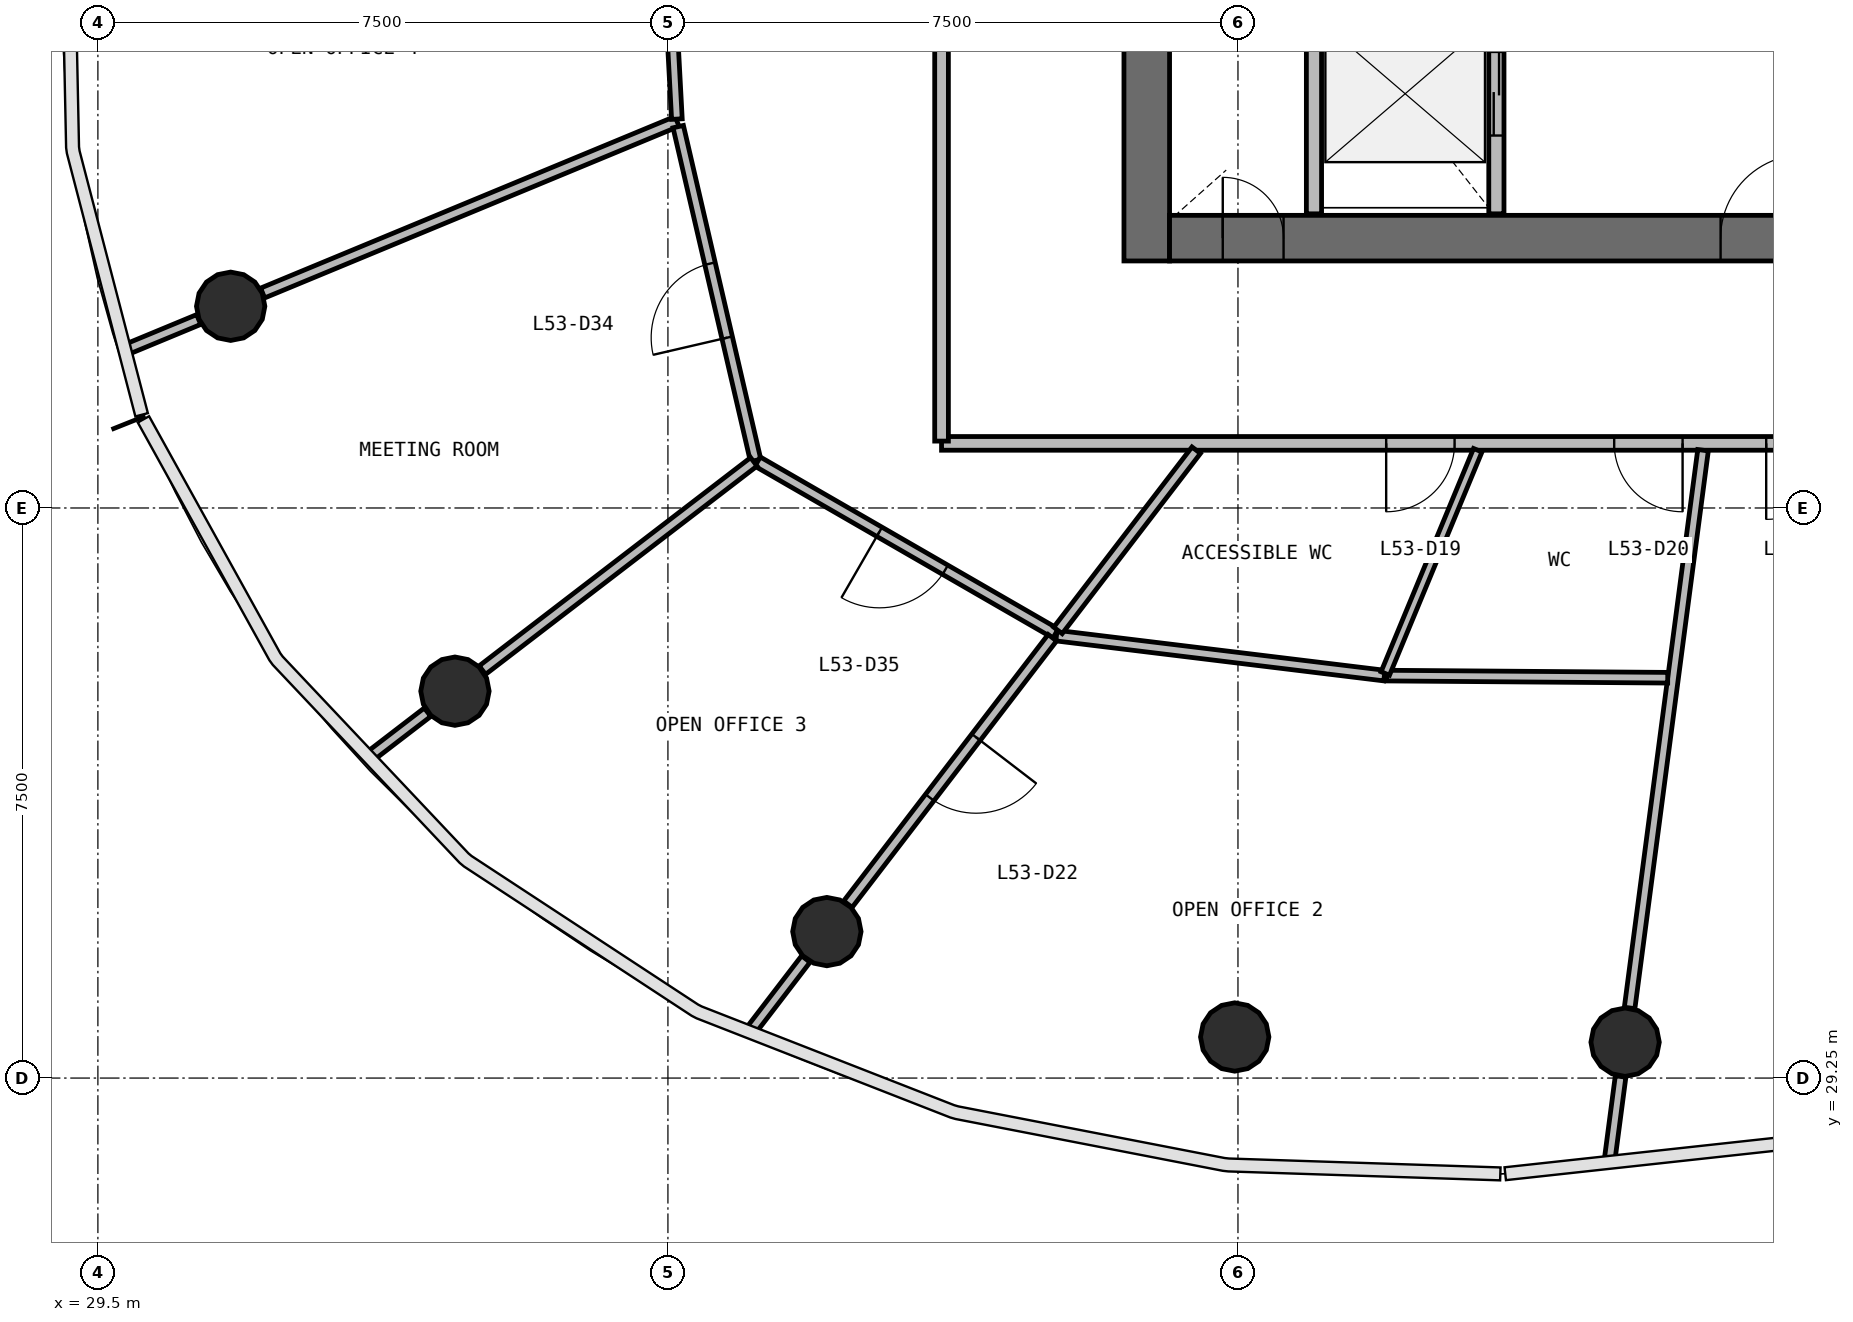
"""IFC4 building model, lengths in metres.
Left out: names, types, materials, properties, quantities, classifications, styles, units other than length and angle.
Written with IfcOpenShell. Run it as: python <this file> out.ifc"""

import sys

from ifc_helpers import new_model, si_unit, direction, frame, frame_2d, origin, origin_2d, place, context, subcontext, project, spatial, rectangle, circle, extrude, source, transform, mapped, element, fill, save


model = new_model("IFC4")
c1 = context("Model", 3, precision=1e-05, world=origin(), true_north=direction((0.0, 1.0)))
c2 = subcontext(c1, "Body", "Model", "MODEL_VIEW")
j1 = project(units=[si_unit("LENGTHUNIT", "METRE"), si_unit("PLANEANGLEUNIT", "RADIAN")], contexts=[c1])
p1 = place(None, origin())
s1 = spatial("IfcSite", under=j1, at=p1, CompositionType="ELEMENT")
p2 = place(p1, origin())
s2 = spatial("IfcBuilding", under=s1, at=p2, CompositionType="ELEMENT")
p3 = place(p2, frame((0.0, 0.0, 218.9)))
s3 = spatial("IfcBuildingStorey", under=s2, at=p3, CompositionType="ELEMENT", Elevation=218.9)
p4 = place(p3, frame((43.3, 56.0, 0.0), z_axis=(0.0, 0.0, 1.0), x_axis=(0.0, -1.0, 0.0)))
e1 = element("IfcWall", 1, at=p4, inside=s3, PredefinedType="SHEAR", context=c2, shape_type="SweptSolid", body=[
    extrude(rectangle(XDim=16.0, YDim=0.6, at=frame_2d((8.0, 0.0))), origin(), (0.0, 0.0, 1.0), 3.9),
])
p5 = place(p4, frame((7.1, 0.0, 0.0)))
e2 = element("IfcOpeningElement", 2, at=p5, cuts=e1, PredefinedType="OPENING", context=c2, shape_type="SweptSolid", body=[
    extrude(rectangle(XDim=1.8, YDim=2.1, at=frame_2d((0.9, 1.05))), frame((0.0, 0.31, 0.0), z_axis=(0.0, -1.0, 0.0), x_axis=(1.0, 0.0, 0.0)), (0.0, 0.0, 1.0), 0.62),
])
p6 = place(p3, frame((43.6, 40.3, 0.0), z_axis=(0.0, 0.0, 1.0), x_axis=(1.0, 0.0, 0.0)))
e3 = element("IfcWall", 3, at=p6, inside=s3, PredefinedType="SHEAR", context=c2, shape_type="SweptSolid", body=[
    extrude(rectangle(XDim=16.8, YDim=0.6, at=frame_2d((8.4, 0.0))), origin(), (0.0, 0.0, 1.0), 3.9),
])
p7 = place(p6, frame((10.3, 0.0, 0.0)))
e4 = element("IfcOpeningElement", 4, at=p7, cuts=e3, PredefinedType="OPENING", context=c2, shape_type="SweptSolid", body=[
    extrude(rectangle(XDim=1.2, YDim=2.1, at=frame_2d((0.6, 1.05))), frame((0.0, 0.31, 0.0), z_axis=(0.0, -1.0, 0.0), x_axis=(1.0, 0.0, 0.0)), (0.0, 0.0, 1.0), 0.62),
])
p8 = place(p6, frame((7.25, 0.0, 0.0)))
e5 = element("IfcOpeningElement", 5, at=p8, cuts=e3, PredefinedType="OPENING", context=c2, shape_type="SweptSolid", body=[
    extrude(rectangle(XDim=1.1, YDim=2.1, at=frame_2d((0.55, 1.05))), frame((0.0, 0.31, 0.0), z_axis=(0.0, -1.0, 0.0), x_axis=(1.0, 0.0, 0.0)), (0.0, 0.0, 1.0), 0.62),
])
p9 = place(p6, frame((0.7, 0.0, 0.0)))
e6 = element("IfcOpeningElement", 6, at=p9, cuts=e3, PredefinedType="OPENING", context=c2, shape_type="SweptSolid", body=[
    extrude(rectangle(XDim=0.8, YDim=2.1, at=frame_2d((0.4, 1.05))), frame((0.0, 0.31, 0.0), z_axis=(0.0, -1.0, 0.0), x_axis=(1.0, 0.0, 0.0)), (0.0, 0.0, 1.0), 0.62),
])
m1 = source(origin(), c2, "Body", "SweptSolid", [
    extrude(circle(Radius=0.45, at=origin_2d()), origin(), (0.0, 0.0, 1.0), 3.9),
])
for number, where, z_axis, x_axis in (
    (7, (31.247, 39.404, 0.0), (0.0, 0.0, 1.0), (1.0, 0.0, 0.0)),
    (8, (34.198, 34.34, 0.0), (0.0, 0.0, 1.0), (1.0, 0.0, 0.0)),
    (9, (39.091, 31.177, 0.0), (0.0, 0.0, 1.0), (1.0, 0.0, 0.0)),
    (10, (44.457, 29.79, 0.0), (0.0, 0.0, 1.0), (1.0, 0.0, 0.0)),
    (11, (49.594, 29.722, 0.0), (0.0, 0.0, 1.0), (1.0, 0.0, 0.0)),
):
    element("IfcColumn", number, at=place(p3, frame(where, z_axis=z_axis, x_axis=x_axis)), inside=s3, PredefinedType="COLUMN", context=c2, shape_type="MappedRepresentation", body=[
        mapped(m1, transform((0.0, 0.0, 0.0), scale=1.0)),
    ])
p10 = place(p3, frame((45.5, 43.6, 0.0), z_axis=(0.0, 0.0, 1.0), x_axis=(0.0, -1.0, 0.0)))
e12 = element("IfcWall", 12, at=p10, inside=s3, PredefinedType="SOLIDWALL", context=c2, shape_type="SweptSolid", body=[
    extrude(rectangle(XDim=2.98, YDim=0.2, at=frame_2d((1.49, 0.0))), origin(), (0.0, 0.0, 1.0), 3.58),
])
p11 = place(p3, frame((47.9, 40.62, 0.0), z_axis=(0.0, 0.0, 1.0), x_axis=(0.0, 1.0, 0.0)))
e13 = element("IfcWall", 13, at=p11, inside=s3, PredefinedType="SOLIDWALL", context=c2, shape_type="SweptSolid", body=[
    extrude(rectangle(XDim=2.95, YDim=0.2, at=frame_2d((1.475, 0.0))), origin(), (0.0, 0.0, 1.0), 3.58),
])
p12 = place(p11, frame((1.03, 0.0, 0.0)))
e14 = element("IfcOpeningElement", 14, at=p12, cuts=e13, PredefinedType="OPENING", context=c2, shape_type="SweptSolid", body=[
    extrude(rectangle(XDim=1.1, YDim=2.1, at=frame_2d((0.55, 1.05))), frame((0.0, 0.11, 0.0), z_axis=(0.0, -1.0, 0.0), x_axis=(1.0, 0.0, 0.0)), (0.0, 0.0, 1.0), 0.22),
])
p13 = place(p3, frame((63.4, 37.6, 0.0), z_axis=(0.0, 0.0, 1.0), x_axis=(-1.0, 0.0, 0.0)))
e15 = element("IfcWall", 15, at=p13, inside=s3, PredefinedType="PARTITIONING", context=c2, shape_type="SweptSolid", body=[
    extrude(rectangle(XDim=22.8, YDim=0.18, at=frame_2d((11.4, 0.0))), origin(), (0.0, 0.0, 1.0), 2.88),
])
p14 = place(p13, frame((16.05, 0.0, 0.0)))
e16 = element("IfcOpeningElement", 16, at=p14, cuts=e15, PredefinedType="OPENING", context=c2, shape_type="SweptSolid", body=[
    extrude(rectangle(XDim=0.9, YDim=2.1, at=frame_2d((0.45, 1.05))), frame((0.0, 0.1, 0.0), z_axis=(0.0, -1.0, 0.0), x_axis=(1.0, 0.0, 0.0)), (0.0, 0.0, 1.0), 0.2),
])
p15 = place(p13, frame((13.05, 0.0, 0.0)))
e17 = element("IfcOpeningElement", 17, at=p15, cuts=e15, PredefinedType="OPENING", context=c2, shape_type="SweptSolid", body=[
    extrude(rectangle(XDim=0.9, YDim=2.1, at=frame_2d((0.45, 1.05))), frame((0.0, 0.1, 0.0), z_axis=(0.0, -1.0, 0.0), x_axis=(1.0, 0.0, 0.0)), (0.0, 0.0, 1.0), 0.2),
])
p16 = place(p13, frame((10.95, 0.0, 0.0)))
e18 = element("IfcOpeningElement", 18, at=p16, cuts=e15, PredefinedType="OPENING", context=c2, shape_type="SweptSolid", body=[
    extrude(rectangle(XDim=1.0, YDim=2.1, at=frame_2d((0.5, 1.05))), frame((0.0, 0.1, 0.0), z_axis=(0.0, -1.0, 0.0), x_axis=(1.0, 0.0, 0.0)), (0.0, 0.0, 1.0), 0.2),
])
p17 = place(p13, frame((5.75, 0.0, 0.0)))
e19 = element("IfcOpeningElement", 19, at=p17, cuts=e15, PredefinedType="OPENING", context=c2, shape_type="SweptSolid", body=[
    extrude(rectangle(XDim=1.0, YDim=2.1, at=frame_2d((0.5, 1.05))), frame((0.0, 0.1, 0.0), z_axis=(0.0, -1.0, 0.0), x_axis=(1.0, 0.0, 0.0)), (0.0, 0.0, 1.0), 0.2),
])
p18 = place(p3, frame((40.6, 37.63, 0.0), z_axis=(0.0, 0.0, 1.0), x_axis=(0.0, 1.0, 0.0)))
e20 = element("IfcWall", 20, at=p18, inside=s3, PredefinedType="PARTITIONING", context=c2, shape_type="SweptSolid", body=[
    extrude(rectangle(XDim=20.74, YDim=0.18, at=frame_2d((10.37, 0.0))), origin(), (0.0, 0.0, 1.0), 2.88),
])
p19 = place(p18, frame((12.09, 0.0, 0.0)))
e21 = element("IfcOpeningElement", 21, at=p19, cuts=e20, PredefinedType="OPENING", context=c2, shape_type="SweptSolid", body=[
    extrude(rectangle(XDim=1.0, YDim=2.1, at=frame_2d((0.5, 1.05))), frame((0.0, 0.1, 0.0), z_axis=(0.0, -1.0, 0.0), x_axis=(1.0, 0.0, 0.0)), (0.0, 0.0, 1.0), 0.2),
])
p20 = place(p18, frame((9.89, 0.0, 0.0)))
e22 = element("IfcOpeningElement", 22, at=p20, cuts=e20, PredefinedType="OPENING", context=c2, shape_type="SweptSolid", body=[
    extrude(rectangle(XDim=1.0, YDim=2.1, at=frame_2d((0.5, 1.05))), frame((0.0, 0.1, 0.0), z_axis=(0.0, -1.0, 0.0), x_axis=(1.0, 0.0, 0.0)), (0.0, 0.0, 1.0), 0.2),
])
p21 = place(p3, frame((49.653, 30.172, 0.0), z_axis=(0.0, 0.0, 1.0), x_axis=(0.130532164535, 0.991444075085, 0.0)))
e23 = element("IfcWall", 23, at=p21, inside=s3, PredefinedType="PARTITIONING", context=c2, shape_type="SweptSolid", body=[
    extrude(rectangle(XDim=7.401, YDim=0.14, at=frame_2d((3.7, 0.0))), origin(), (0.0, 0.0, 1.0), 2.88),
])
p22 = place(p3, frame((37.12, 41.836, 0.0), z_axis=(0.0, 0.0, 1.0), x_axis=(-0.923888768436, -0.382661134108, 0.0)))
e24 = element("IfcWall", 24, at=p22, inside=s3, PredefinedType="PARTITIONING", context=c2, shape_type="SweptSolid", body=[
    extrude(rectangle(XDim=5.902, YDim=0.14, at=frame_2d((2.951, 0.0))), origin(), (0.0, 0.0, 1.0), 2.88),
])
p23 = place(p3, frame((38.154, 37.375, 0.0), z_axis=(0.0, 0.0, 1.0), x_axis=(-0.225883778656, 0.974154258082, 0.0)))
e25 = element("IfcWall", 25, at=p23, inside=s3, PredefinedType="PARTITIONING", context=c2, shape_type="SweptSolid", body=[
    extrude(rectangle(XDim=4.508, YDim=0.14, at=frame_2d((2.254, 0.0))), origin(), (0.0, 0.0, 1.0), 2.88),
])
p24 = place(p23, frame((1.658, 0.0, 0.0)))
e26 = element("IfcOpeningElement", 26, at=p24, cuts=e25, PredefinedType="OPENING", context=c2, shape_type="SweptSolid", body=[
    extrude(rectangle(XDim=1.0, YDim=2.1, at=frame_2d((0.5, 1.05))), frame((0.0, 0.08, 0.0), z_axis=(0.0, -1.0, 0.0), x_axis=(1.0, 0.0, 0.0)), (0.0, 0.0, 1.0), 0.16),
])
p25 = place(p3, frame((42.101, 35.099, 0.0), z_axis=(0.0, 0.0, 1.0), x_axis=(-0.866291519496, 0.499538790535, 0.0)))
e27 = element("IfcWall", 27, at=p25, inside=s3, PredefinedType="PARTITIONING", context=c2, shape_type="SweptSolid", body=[
    extrude(rectangle(XDim=4.527, YDim=0.14, at=frame_2d((2.263, 0.0))), origin(), (0.0, 0.0, 1.0), 2.88),
])
p26 = place(p25, frame((1.677, 0.0, 0.0)))
e28 = element("IfcOpeningElement", 28, at=p26, cuts=e27, PredefinedType="OPENING", context=c2, shape_type="SweptSolid", body=[
    extrude(rectangle(XDim=1.0, YDim=2.1, at=frame_2d((0.5, 1.05))), frame((0.0, 0.08, 0.0), z_axis=(0.0, -1.0, 0.0), x_axis=(1.0, 0.0, 0.0)), (0.0, 0.0, 1.0), 0.16),
])
p27 = place(p3, frame((38.13, 37.357, 0.0), z_axis=(0.0, 0.0, 1.0), x_axis=(-0.793359272934, -0.60875369736, 0.0)))
e29 = element("IfcWall", 29, at=p27, inside=s3, PredefinedType="PARTITIONING", context=c2, shape_type="SweptSolid", body=[
    extrude(rectangle(XDim=4.502, YDim=0.14, at=frame_2d((2.251, 0.0))), origin(), (0.0, 0.0, 1.0), 2.88),
])
p28 = place(p3, frame((42.058, 35.043, 0.0), z_axis=(0.0, 0.0, 1.0), x_axis=(-0.608794526213, -0.793327942816, 0.0)))
e30 = element("IfcWall", 30, at=p28, inside=s3, PredefinedType="PARTITIONING", context=c2, shape_type="SweptSolid", body=[
    extrude(rectangle(XDim=4.419, YDim=0.14, at=frame_2d((2.209, 0.0))), origin(), (0.0, 0.0, 1.0), 2.88),
])
p29 = place(p28, frame((1.65, 0.0, 0.0)))
e31 = element("IfcOpeningElement", 31, at=p29, cuts=e30, PredefinedType="OPENING", context=c2, shape_type="SweptSolid", body=[
    extrude(rectangle(XDim=1.0, YDim=2.1, at=frame_2d((0.5, 1.05))), frame((0.0, 0.08, 0.0), z_axis=(0.0, -1.0, 0.0), x_axis=(1.0, 0.0, 0.0)), (0.0, 0.0, 1.0), 0.16),
])
p30 = place(p3, frame((42.112, 35.071, 0.0), z_axis=(0.0, 0.0, 1.0), x_axis=(0.992646700661, -0.121047625618, 0.0)))
e32 = element("IfcWall", 32, at=p30, inside=s3, PredefinedType="PARTITIONING", context=c2, shape_type="SweptSolid", body=[
    extrude(rectangle(XDim=4.346, YDim=0.14, at=frame_2d((2.173, 0.0))), origin(), (0.0, 0.0, 1.0), 2.88),
])
p31 = place(p3, frame((37.118, 41.866, 0.0), z_axis=(0.0, 0.0, 1.0), x_axis=(-0.053180494254, 0.998584916285, 0.0)))
e33 = element("IfcWall", 33, at=p31, inside=s3, PredefinedType="PARTITIONING", context=c2, shape_type="SweptSolid", body=[
    extrude(rectangle(XDim=4.081, YDim=0.14, at=frame_2d((2.041, 0.0))), origin(), (0.0, 0.0, 1.0), 2.88),
])
p32 = place(p31, frame((1.631, 0.0, 0.0)))
e34 = element("IfcOpeningElement", 34, at=p32, cuts=e33, PredefinedType="OPENING", context=c2, shape_type="SweptSolid", body=[
    extrude(rectangle(XDim=1.0, YDim=2.1, at=frame_2d((0.5, 1.05))), frame((0.0, 0.08, 0.0), z_axis=(0.0, -1.0, 0.0), x_axis=(1.0, 0.0, 0.0)), (0.0, 0.0, 1.0), 0.16),
])
p33 = place(p3, frame((46.457, 34.545, 0.0), z_axis=(0.0, 0.0, 1.0), x_axis=(0.999971172409, -0.007593046208, 0.0)))
e35 = element("IfcWall", 35, at=p33, inside=s3, PredefinedType="PARTITIONING", context=c2, shape_type="SweptSolid", body=[
    extrude(rectangle(XDim=3.698, YDim=0.14, at=frame_2d((1.849, 0.0))), origin(), (0.0, 0.0, 1.0), 2.88),
])
p34 = place(p3, frame((43.951, 37.51, 0.0), z_axis=(0.0, 0.0, 1.0), x_axis=(-0.60873508117, -0.793373557004, 0.0)))
e36 = element("IfcWall", 36, at=p34, inside=s3, PredefinedType="PARTITIONING", context=c2, shape_type="SweptSolid", body=[
    extrude(rectangle(XDim=2.988, YDim=0.14, at=frame_2d((1.494, 0.0))), origin(), (0.0, 0.0, 1.0), 2.88),
])
p35 = place(p3, frame((38.814, 30.816, 0.0), z_axis=(0.0, 0.0, 1.0), x_axis=(-0.608692390952, -0.793406310283, 0.0)))
e37 = element("IfcWall", 37, at=p35, inside=s3, PredefinedType="PARTITIONING", context=c2, shape_type="SweptSolid", body=[
    extrude(rectangle(XDim=1.159, YDim=0.14, at=frame_2d((0.58, 0.0))), origin(), (0.0, 0.0, 1.0), 2.88),
])
p36 = place(p3, frame((49.393, 28.194, 0.0), z_axis=(0.0, 0.0, 1.0), x_axis=(0.130338250237, 0.991469586284, 0.0)))
e38 = element("IfcWall", 38, at=p36, inside=s3, PredefinedType="PARTITIONING", context=c2, shape_type="SweptSolid", body=[
    extrude(rectangle(XDim=1.086, YDim=0.14, at=frame_2d((0.543, 0.0))), origin(), (0.0, 0.0, 1.0), 2.88),
])
p37 = place(p3, frame((30.826, 39.23, 0.0), z_axis=(0.0, 0.0, 1.0), x_axis=(-0.92379344364, -0.382891203199, 0.0)))
e39 = element("IfcWall", 39, at=p37, inside=s3, PredefinedType="PARTITIONING", context=c2, shape_type="SweptSolid", body=[
    extrude(rectangle(XDim=1.026, YDim=0.14, at=frame_2d((0.513, 0.0))), origin(), (0.0, 0.0, 1.0), 2.88),
])
p38 = place(p3, frame((33.837, 34.063, 0.0), z_axis=(0.0, 0.0, 1.0), x_axis=(-0.793424757602, -0.608668344852, 0.0)))
e40 = element("IfcWall", 40, at=p38, inside=s3, PredefinedType="PARTITIONING", context=c2, shape_type="SweptSolid", body=[
    extrude(rectangle(XDim=0.974, YDim=0.14, at=frame_2d((0.487, 0.0))), origin(), (0.0, 0.0, 1.0), 2.88),
])
p39 = place(p3, frame((47.655, 37.51, 0.0), z_axis=(0.0, 0.0, 1.0), x_axis=(-0.382656992791, -0.923890483698, 0.0)))
e41 = element("IfcWall", 41, at=p39, inside=s3, PredefinedType="PARTITIONING", context=c2, shape_type="SweptSolid", body=[
    extrude(rectangle(XDim=3.179, YDim=0.12, at=frame_2d((1.59, 0.0))), origin(), (0.0, 0.0, 1.0), 2.88),
])
m2 = source(origin(), c2, "Body", "SweptSolid", [
    extrude(rectangle(XDim=1.1, YDim=2.1, at=frame_2d((0.55, 1.05))), frame((0.0, 0.025, 0.0), z_axis=(0.0, -1.0, 0.0), x_axis=(1.0, 0.0, 0.0)), (0.0, 0.0, 1.0), 0.05),
])
p40 = place(p12, origin())
e42 = element("IfcDoor", 42, at=p40, inside=s3, OperationType="DOUBLE_DOOR_SLIDING", PredefinedType="USERDEFINED", context=c2, shape_type="MappedRepresentation", body=[
    mapped(m2, transform((0.0, 0.0, 0.0), scale=1.0)),
])
fill(e14, e42)
m3 = source(origin(), c2, "Body", "SweptSolid", [
    extrude(rectangle(XDim=1.1, YDim=2.1, at=frame_2d((0.55, 1.05))), frame((0.0, 0.025, 0.0), z_axis=(0.0, -1.0, 0.0), x_axis=(1.0, 0.0, 0.0)), (0.0, 0.0, 1.0), 0.05),
])
p41 = place(p8, origin())
e43 = element("IfcDoor", 43, at=p41, inside=s3, OperationType="SINGLE_SWING_RIGHT", PredefinedType="DOOR", context=c2, shape_type="MappedRepresentation", body=[
    mapped(m3, transform((0.0, 0.0, 0.0), scale=1.0)),
])
fill(e5, e43)
m4 = source(origin(), c2, "Body", "SweptSolid", [
    extrude(rectangle(XDim=0.8, YDim=2.1, at=frame_2d((0.4, 1.05))), frame((0.0, 0.025, 0.0), z_axis=(0.0, -1.0, 0.0), x_axis=(1.0, 0.0, 0.0)), (0.0, 0.0, 1.0), 0.05),
])
p42 = place(p9, origin())
e44 = element("IfcDoor", 44, at=p42, inside=s3, OperationType="SINGLE_SWING_LEFT", PredefinedType="DOOR", context=c2, shape_type="MappedRepresentation", body=[
    mapped(m4, transform((0.0, 0.0, 0.0), scale=1.0)),
])
fill(e6, e44)
m5 = source(origin(), c2, "Body", "SweptSolid", [
    extrude(rectangle(XDim=0.9, YDim=2.1, at=frame_2d((0.45, 1.05))), frame((0.0, 0.025, 0.0), z_axis=(0.0, -1.0, 0.0), x_axis=(1.0, 0.0, 0.0)), (0.0, 0.0, 1.0), 0.05),
])
p43 = place(p14, origin())
e45 = element("IfcDoor", 45, at=p43, inside=s3, OperationType="SINGLE_SWING_RIGHT", PredefinedType="DOOR", context=c2, shape_type="MappedRepresentation", body=[
    mapped(m5, transform((0.0, 0.0, 0.0), scale=1.0)),
])
fill(e16, e45)
p44 = place(p15, origin())
e46 = element("IfcDoor", 46, at=p44, inside=s3, OperationType="SINGLE_SWING_LEFT", PredefinedType="DOOR", context=c2, shape_type="MappedRepresentation", body=[
    mapped(m5, transform((0.0, 0.0, 0.0), scale=1.0)),
])
fill(e17, e46)
m6 = source(origin(), c2, "Body", "SweptSolid", [
    extrude(rectangle(XDim=1.0, YDim=2.1, at=frame_2d((0.5, 1.05))), frame((0.0, 0.025, 0.0), z_axis=(0.0, -1.0, 0.0), x_axis=(1.0, 0.0, 0.0)), (0.0, 0.0, 1.0), 0.05),
])
p45 = place(p16, origin())
e47 = element("IfcDoor", 47, at=p45, inside=s3, OperationType="SINGLE_SWING_RIGHT", PredefinedType="DOOR", context=c2, shape_type="MappedRepresentation", body=[
    mapped(m6, transform((0.0, 0.0, 0.0), scale=1.0)),
])
fill(e18, e47)
p46 = place(p29, origin())
e48 = element("IfcDoor", 48, at=p46, inside=s3, OperationType="SINGLE_SWING_LEFT", PredefinedType="DOOR", context=c2, shape_type="MappedRepresentation", body=[
    mapped(m6, transform((0.0, 0.0, 0.0), scale=1.0)),
])
fill(e31, e48)
p47 = place(p24, origin())
e49 = element("IfcDoor", 49, at=p47, inside=s3, OperationType="SINGLE_SWING_LEFT", PredefinedType="DOOR", context=c2, shape_type="MappedRepresentation", body=[
    mapped(m6, transform((0.0, 0.0, 0.0), scale=1.0)),
])
fill(e26, e49)
p48 = place(p26, origin())
e50 = element("IfcDoor", 50, at=p48, inside=s3, OperationType="SINGLE_SWING_RIGHT", PredefinedType="DOOR", context=c2, shape_type="MappedRepresentation", body=[
    mapped(m6, transform((0.0, 0.0, 0.0), scale=1.0)),
])
fill(e28, e50)
save(model, sys.argv[1])
